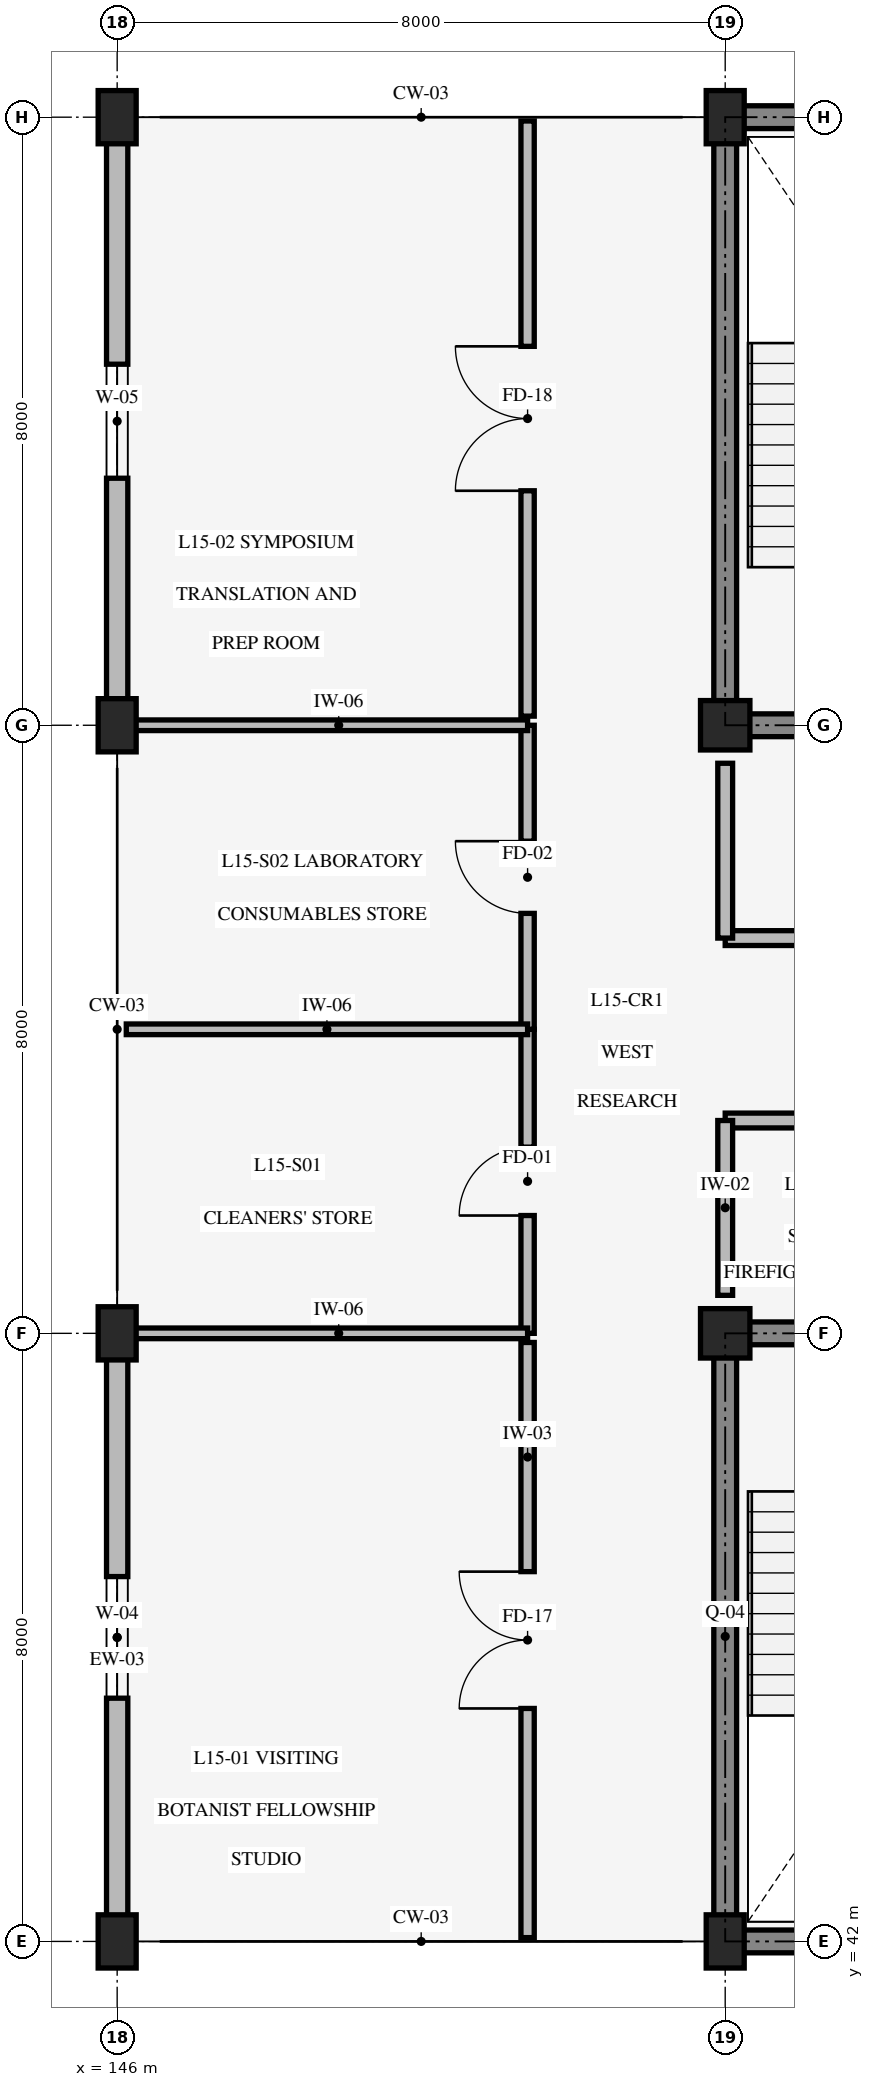
"""IFC4 building model, lengths in metres.
Left out: names, types, materials, properties, quantities, classifications, styles, units other than length and angle.
Written with IfcOpenShell. Run it as: python <this file> out.ifc"""

import sys

from ifc_helpers import new_model, si_unit, direction, frame, frame_2d, origin, origin_2d, place, context, subcontext, project, spatial, rectangle, extrude, element, fill, save


model = new_model("IFC4")
c1 = context("Model", 3, precision=1e-05, world=origin(), true_north=direction((0.0, 1.0)))
c2 = subcontext(c1, "Body", "Model", "MODEL_VIEW")
j1 = project(units=[si_unit("LENGTHUNIT", "METRE"), si_unit("PLANEANGLEUNIT", "RADIAN")], contexts=[c1])
p1 = place(None, origin())
s1 = spatial("IfcSite", under=j1, at=p1, CompositionType="ELEMENT")
p2 = place(p1, origin())
s2 = spatial("IfcBuilding", under=s1, at=p2, CompositionType="ELEMENT")
p3 = place(p2, frame((0.0, 0.0, 61.2)))
s3 = spatial("IfcBuildingStorey", under=s2, at=p3, CompositionType="ELEMENT", Elevation=61.2)
p4 = place(p3, frame((154.0, 42.0, 0.0), z_axis=(0.0, 0.0, 1.0), x_axis=(1.0, 0.0, 0.0)))
e1 = element("IfcWall", 1, at=p4, inside=s3, PredefinedType="SHEAR", context=c2, shape_type="SweptSolid", body=[
    extrude(rectangle(XDim=8.0, YDim=0.3, at=frame_2d((4.0, 0.0))), origin(), (0.0, 0.0, 1.0), 3.95),
])
p5 = place(p3, frame((162.0, 50.0, 0.0), z_axis=(0.0, 0.0, 1.0), x_axis=(-1.0, 0.0, 0.0)))
e2 = element("IfcWall", 2, at=p5, inside=s3, PredefinedType="SHEAR", context=c2, shape_type="SweptSolid", body=[
    extrude(rectangle(XDim=8.0, YDim=0.3, at=frame_2d((4.0, 0.0))), origin(), (0.0, 0.0, 1.0), 3.95),
])
p6 = place(p5, frame((5.3, 0.0, 0.0)))
e3 = element("IfcOpeningElement", 3, at=p6, cuts=e2, PredefinedType="OPENING", context=c2, shape_type="SweptSolid", body=[
    extrude(rectangle(XDim=1.3, YDim=2.15, at=frame_2d((0.65, 1.075))), frame((0.0, 0.16, 0.0), z_axis=(0.0, -1.0, 0.0), x_axis=(1.0, 0.0, 0.0)), (0.0, 0.0, 1.0), 0.32),
])
p7 = place(p5, frame((1.45, 0.0, 0.0)))
e4 = element("IfcOpeningElement", 4, at=p7, cuts=e2, PredefinedType="OPENING", context=c2, shape_type="SweptSolid", body=[
    extrude(rectangle(XDim=1.1, YDim=2.2, at=frame_2d((0.55, 1.1))), frame((0.0, 0.16, 0.0), z_axis=(0.0, -1.0, 0.0), x_axis=(1.0, 0.0, 0.0)), (0.0, 0.0, 1.0), 0.32),
])
p8 = place(p3, frame((154.0, 50.0, 0.0), z_axis=(0.0, 0.0, 1.0), x_axis=(0.0, -1.0, 0.0)))
e5 = element("IfcWall", 5, at=p8, inside=s3, PredefinedType="SHEAR", context=c2, shape_type="SweptSolid", body=[
    extrude(rectangle(XDim=8.0, YDim=0.3, at=frame_2d((4.0, 0.0))), origin(), (0.0, 0.0, 1.0), 3.95),
])
p9 = place(p3, frame((154.0, 58.0, 0.0), z_axis=(0.0, 0.0, 1.0), x_axis=(1.0, 0.0, 0.0)))
e6 = element("IfcWall", 6, at=p9, inside=s3, PredefinedType="SHEAR", context=c2, shape_type="SweptSolid", body=[
    extrude(rectangle(XDim=8.0, YDim=0.3, at=frame_2d((4.0, 0.0))), origin(), (0.0, 0.0, 1.0), 3.95),
])
p10 = place(p9, frame((1.4, 0.0, 0.0)))
e7 = element("IfcOpeningElement", 7, at=p10, cuts=e6, PredefinedType="OPENING", context=c2, shape_type="SweptSolid", body=[
    extrude(rectangle(XDim=1.3, YDim=2.15, at=frame_2d((0.65, 1.075))), frame((0.0, 0.16, 0.0), z_axis=(0.0, -1.0, 0.0), x_axis=(1.0, 0.0, 0.0)), (0.0, 0.0, 1.0), 0.32),
])
p11 = place(p9, frame((5.3, 0.0, 0.0)))
e8 = element("IfcOpeningElement", 8, at=p11, cuts=e6, PredefinedType="OPENING", context=c2, shape_type="SweptSolid", body=[
    extrude(rectangle(XDim=1.1, YDim=2.2, at=frame_2d((0.55, 1.1))), frame((0.0, 0.16, 0.0), z_axis=(0.0, -1.0, 0.0), x_axis=(1.0, 0.0, 0.0)), (0.0, 0.0, 1.0), 0.32),
])
for number, where, z_axis, x_axis in (
    (9, (162.0, 66.0, 0.0), (0.0, 0.0, 1.0), (-1.0, 0.0, 0.0)),
    (10, (154.0, 66.0, 0.0), (0.0, 0.0, 1.0), (0.0, -1.0, 0.0)),
):
    element("IfcWall", number, at=place(p3, frame(where, z_axis=z_axis, x_axis=x_axis)), inside=s3, PredefinedType="SHEAR", context=c2, shape_type="SweptSolid", body=[
        extrude(rectangle(XDim=8.0, YDim=0.3, at=frame_2d((4.0, 0.0))), origin(), (0.0, 0.0, 1.0), 3.95),
    ])
for number, where, z_axis, x_axis in (
    (11, (146.0, 42.0, 0.0), (0.0, 0.0, 1.0), (1.0, 0.0, 0.0)),
    (12, (146.0, 50.0, 0.0), (0.0, 0.0, 1.0), (1.0, 0.0, 0.0)),
    (13, (146.0, 58.0, 0.0), (0.0, 0.0, 1.0), (1.0, 0.0, 0.0)),
    (14, (146.0, 66.0, 0.0), (0.0, 0.0, 1.0), (1.0, 0.0, 0.0)),
    (15, (154.0, 42.0, 0.0), (0.0, 0.0, 1.0), (1.0, 0.0, 0.0)),
):
    element("IfcColumn", number, at=place(p3, frame(where, z_axis=z_axis, x_axis=x_axis)), inside=s3, PredefinedType="COLUMN", context=c2, shape_type="SweptSolid", body=[
        extrude(rectangle(XDim=0.5, YDim=0.7, at=origin_2d()), origin(), (0.0, 0.0, 1.0), 4.2),
    ])
for number, where, z_axis, x_axis in (
    (16, (154.0, 50.0, 0.0), (0.0, 0.0, 1.0), (1.0, 0.0, 0.0)),
    (17, (154.0, 58.0, 0.0), (0.0, 0.0, 1.0), (1.0, 0.0, 0.0)),
):
    element("IfcColumn", number, at=place(p3, frame(where, z_axis=z_axis, x_axis=x_axis)), inside=s3, PredefinedType="COLUMN", context=c2, shape_type="SweptSolid", body=[
        extrude(rectangle(XDim=0.65, YDim=0.65, at=origin_2d()), origin(), (0.0, 0.0, 1.0), 4.2),
    ])
p12 = place(p3, frame((154.0, 66.0, 0.0), z_axis=(0.0, 0.0, 1.0), x_axis=(1.0, 0.0, 0.0)))
e18 = element("IfcColumn", 18, at=p12, inside=s3, PredefinedType="COLUMN", context=c2, shape_type="SweptSolid", body=[
    extrude(rectangle(XDim=0.5, YDim=0.7, at=origin_2d()), origin(), (0.0, 0.0, 1.0), 4.2),
])
p13 = place(p3, frame((146.0, 42.0, 0.0), z_axis=(0.0, 0.0, 1.0), x_axis=(0.0, 1.0, 0.0)))
e19 = element("IfcWall", 19, at=p13, inside=s3, PredefinedType="STANDARD", context=c2, shape_type="SweptSolid", body=[
    extrude(rectangle(XDim=8.0, YDim=0.28, at=frame_2d((4.0, 0.0))), origin(), (0.0, 0.0, 1.0), 3.29),
])
p14 = place(p13, frame((3.2, 0.0, 0.85)))
e20 = element("IfcOpeningElement", 20, at=p14, cuts=e19, PredefinedType="OPENING", context=c2, shape_type="SweptSolid", body=[
    extrude(rectangle(XDim=1.6, YDim=1.2, at=frame_2d((0.8, 0.6))), frame((0.0, 0.15, 0.0), z_axis=(0.0, -1.0, 0.0), x_axis=(1.0, 0.0, 0.0)), (0.0, 0.0, 1.0), 0.3),
])
p15 = place(p3, frame((146.0, 58.0, 0.0), z_axis=(0.0, 0.0, 1.0), x_axis=(0.0, 1.0, 0.0)))
e21 = element("IfcWall", 21, at=p15, inside=s3, PredefinedType="STANDARD", context=c2, shape_type="SweptSolid", body=[
    extrude(rectangle(XDim=8.0, YDim=0.28, at=frame_2d((4.0, 0.0))), origin(), (0.0, 0.0, 1.0), 3.29),
])
p16 = place(p15, frame((3.25, 0.0, 0.85)))
e22 = element("IfcOpeningElement", 22, at=p16, cuts=e21, PredefinedType="OPENING", context=c2, shape_type="SweptSolid", body=[
    extrude(rectangle(XDim=1.5, YDim=1.5, at=frame_2d((0.75, 0.75))), frame((0.0, 0.15, 0.0), z_axis=(0.0, -1.0, 0.0), x_axis=(1.0, 0.0, 0.0)), (0.0, 0.0, 1.0), 0.3),
])
p17 = place(p3, frame((154.0, 52.8, 0.0), z_axis=(0.0, 0.0, 1.0), x_axis=(1.0, 0.0, 0.0)))
e23 = element("IfcWall", 23, at=p17, inside=s3, PredefinedType="STANDARD", context=c2, shape_type="SweptSolid", body=[
    extrude(rectangle(XDim=7.6, YDim=0.195, at=frame_2d((3.8, 0.0))), origin(), (0.0, 0.0, 1.0), 3.9),
])
p18 = place(p17, frame((2.8, 0.0, 0.0)))
e24 = element("IfcOpeningElement", 24, at=p18, cuts=e23, PredefinedType="OPENING", context=c2, shape_type="SweptSolid", body=[
    extrude(rectangle(XDim=1.35, YDim=2.15, at=frame_2d((0.675, 1.075))), frame((0.0, 0.107, 0.0), z_axis=(0.0, -1.0, 0.0), x_axis=(1.0, 0.0, 0.0)), (0.0, 0.0, 1.0), 0.215),
])
p19 = place(p3, frame((154.0, 50.5, 0.0), z_axis=(0.0, 0.0, 1.0), x_axis=(0.0, 1.0, 0.0)))
e25 = element("IfcWall", 25, at=p19, inside=s3, PredefinedType="STANDARD", context=c2, shape_type="SweptSolid", body=[
    extrude(rectangle(XDim=2.3, YDim=0.195, at=frame_2d((1.15, 0.0))), origin(), (0.0, 0.0, 1.0), 3.29),
])
p20 = place(p3, frame((154.0, 55.2, 0.0), z_axis=(0.0, 0.0, 1.0), x_axis=(1.0, 0.0, 0.0)))
e26 = element("IfcWall", 26, at=p20, inside=s3, PredefinedType="STANDARD", context=c2, shape_type="SweptSolid", body=[
    extrude(rectangle(XDim=7.6, YDim=0.195, at=frame_2d((3.8, 0.0))), origin(), (0.0, 0.0, 1.0), 3.9),
])
p21 = place(p20, frame((2.8, 0.0, 0.0)))
e27 = element("IfcOpeningElement", 27, at=p21, cuts=e26, PredefinedType="OPENING", context=c2, shape_type="SweptSolid", body=[
    extrude(rectangle(XDim=1.45, YDim=2.2, at=frame_2d((0.725, 1.1))), frame((0.0, 0.107, 0.0), z_axis=(0.0, -1.0, 0.0), x_axis=(1.0, 0.0, 0.0)), (0.0, 0.0, 1.0), 0.215),
])
p22 = place(p3, frame((154.0, 55.2, 0.0), z_axis=(0.0, 0.0, 1.0), x_axis=(0.0, 1.0, 0.0)))
e28 = element("IfcWall", 28, at=p22, inside=s3, PredefinedType="STANDARD", context=c2, shape_type="SweptSolid", body=[
    extrude(rectangle(XDim=2.3, YDim=0.195, at=frame_2d((1.15, 0.0))), origin(), (0.0, 0.0, 1.0), 3.29),
])
p23 = place(p3, frame((151.4, 42.05, 0.0), z_axis=(0.0, 0.0, 1.0), x_axis=(0.0, 1.0, 0.0)))
e29 = element("IfcWall", 29, at=p23, inside=s3, PredefinedType="STANDARD", context=c2, shape_type="SweptSolid", body=[
    extrude(rectangle(XDim=7.83, YDim=0.175, at=frame_2d((3.915, 0.0))), origin(), (0.0, 0.0, 1.0), 3.9),
])
p24 = place(p23, frame((3.015, 0.0, 0.0)))
e30 = element("IfcOpeningElement", 30, at=p24, cuts=e29, PredefinedType="OPENING", context=c2, shape_type="SweptSolid", body=[
    extrude(rectangle(XDim=1.8, YDim=2.3, at=frame_2d((0.9, 1.15))), frame((0.0, 0.098, 0.0), z_axis=(0.0, -1.0, 0.0), x_axis=(1.0, 0.0, 0.0)), (0.0, 0.0, 1.0), 0.195),
])
p25 = place(p3, frame((151.4, 58.12, 0.0), z_axis=(0.0, 0.0, 1.0), x_axis=(0.0, 1.0, 0.0)))
e31 = element("IfcWall", 31, at=p25, inside=s3, PredefinedType="STANDARD", context=c2, shape_type="SweptSolid", body=[
    extrude(rectangle(XDim=7.83, YDim=0.175, at=frame_2d((3.915, 0.0))), origin(), (0.0, 0.0, 1.0), 3.9),
])
p26 = place(p25, frame((2.965, 0.0, 0.0)))
e32 = element("IfcOpeningElement", 32, at=p26, cuts=e31, PredefinedType="OPENING", context=c2, shape_type="SweptSolid", body=[
    extrude(rectangle(XDim=1.9, YDim=2.35, at=frame_2d((0.95, 1.175))), frame((0.0, 0.098, 0.0), z_axis=(0.0, -1.0, 0.0), x_axis=(1.0, 0.0, 0.0)), (0.0, 0.0, 1.0), 0.195),
])
p27 = place(p3, frame((151.4, 50.0, 0.0), z_axis=(0.0, 0.0, 1.0), x_axis=(0.0, 1.0, 0.0)))
e33 = element("IfcWall", 33, at=p27, inside=s3, PredefinedType="STANDARD", context=c2, shape_type="SweptSolid", body=[
    extrude(rectangle(XDim=4.0, YDim=0.175, at=frame_2d((2.0, 0.0))), origin(), (0.0, 0.0, 1.0), 3.9),
])
p28 = place(p27, frame((1.55, 0.0, 0.0)))
e34 = element("IfcOpeningElement", 34, at=p28, cuts=e33, PredefinedType="OPENING", context=c2, shape_type="SweptSolid", body=[
    extrude(rectangle(XDim=0.9, YDim=2.1, at=frame_2d((0.45, 1.05))), frame((0.0, 0.098, 0.0), z_axis=(0.0, -1.0, 0.0), x_axis=(1.0, 0.0, 0.0)), (0.0, 0.0, 1.0), 0.195),
])
p29 = place(p3, frame((151.4, 54.0, 0.0), z_axis=(0.0, 0.0, 1.0), x_axis=(0.0, 1.0, 0.0)))
e35 = element("IfcWall", 35, at=p29, inside=s3, PredefinedType="STANDARD", context=c2, shape_type="SweptSolid", body=[
    extrude(rectangle(XDim=4.0, YDim=0.175, at=frame_2d((2.0, 0.0))), origin(), (0.0, 0.0, 1.0), 3.9),
])
p30 = place(p29, frame((1.525, 0.0, 0.0)))
e36 = element("IfcOpeningElement", 36, at=p30, cuts=e35, PredefinedType="OPENING", context=c2, shape_type="SweptSolid", body=[
    extrude(rectangle(XDim=0.95, YDim=2.1, at=frame_2d((0.475, 1.05))), frame((0.0, 0.098, 0.0), z_axis=(0.0, -1.0, 0.0), x_axis=(1.0, 0.0, 0.0)), (0.0, 0.0, 1.0), 0.195),
])
p31 = place(p3, frame((146.12, 50.0, 0.0), z_axis=(0.0, 0.0, 1.0), x_axis=(1.0, 0.0, 0.0)))
e37 = element("IfcWall", 37, at=p31, inside=s3, PredefinedType="STANDARD", context=c2, shape_type="SweptSolid", body=[
    extrude(rectangle(XDim=5.28, YDim=0.14, at=frame_2d((2.64, 0.0))), origin(), (0.0, 0.0, 1.0), 3.24),
])
p32 = place(p3, frame((146.12, 54.0, 0.0), z_axis=(0.0, 0.0, 1.0), x_axis=(1.0, 0.0, 0.0)))
e38 = element("IfcWall", 38, at=p32, inside=s3, PredefinedType="STANDARD", context=c2, shape_type="SweptSolid", body=[
    extrude(rectangle(XDim=5.28, YDim=0.14, at=frame_2d((2.64, 0.0))), origin(), (0.0, 0.0, 1.0), 3.9),
])
p33 = place(p3, frame((146.12, 58.0, 0.0), z_axis=(0.0, 0.0, 1.0), x_axis=(1.0, 0.0, 0.0)))
e39 = element("IfcWall", 39, at=p33, inside=s3, PredefinedType="STANDARD", context=c2, shape_type="SweptSolid", body=[
    extrude(rectangle(XDim=5.28, YDim=0.14, at=frame_2d((2.64, 0.0))), origin(), (0.0, 0.0, 1.0), 3.24),
])
p34 = place(p14, origin())
e40 = element("IfcWindow", 40, at=p34, inside=s3, PartitioningType="SINGLE_PANEL", PredefinedType="WINDOW", context=c2, shape_type="SweptSolid", body=[
    extrude(rectangle(XDim=1.6, YDim=1.2, at=frame_2d((0.8, 0.6))), frame((0.0, 0.03, 0.0), z_axis=(0.0, -1.0, 0.0), x_axis=(1.0, 0.0, 0.0)), (0.0, 0.0, 1.0), 0.06),
])
fill(e20, e40)
p35 = place(p16, origin())
e41 = element("IfcWindow", 41, at=p35, inside=s3, PartitioningType="SINGLE_PANEL", PredefinedType="WINDOW", context=c2, shape_type="SweptSolid", body=[
    extrude(rectangle(XDim=1.5, YDim=1.5, at=frame_2d((0.75, 0.75))), frame((0.0, 0.03, 0.0), z_axis=(0.0, -1.0, 0.0), x_axis=(1.0, 0.0, 0.0)), (0.0, 0.0, 1.0), 0.06),
])
fill(e22, e41)
p36 = place(p24, origin())
e42 = element("IfcDoor", 42, at=p36, inside=s3, OperationType="DOUBLE_DOOR_SINGLE_SWING", PredefinedType="DOOR", context=c2, shape_type="SweptSolid", body=[
    extrude(rectangle(XDim=1.8, YDim=2.3, at=frame_2d((0.9, 1.15))), frame((0.0, 0.025, 0.0), z_axis=(0.0, -1.0, 0.0), x_axis=(1.0, 0.0, 0.0)), (0.0, 0.0, 1.0), 0.05),
])
fill(e30, e42)
p37 = place(p26, origin())
e43 = element("IfcDoor", 43, at=p37, inside=s3, OperationType="DOUBLE_DOOR_SINGLE_SWING", PredefinedType="DOOR", context=c2, shape_type="SweptSolid", body=[
    extrude(rectangle(XDim=1.9, YDim=2.35, at=frame_2d((0.95, 1.175))), frame((0.0, 0.025, 0.0), z_axis=(0.0, -1.0, 0.0), x_axis=(1.0, 0.0, 0.0)), (0.0, 0.0, 1.0), 0.05),
])
fill(e32, e43)
p38 = place(p28, origin())
e44 = element("IfcDoor", 44, at=p38, inside=s3, OperationType="SINGLE_SWING_LEFT", PredefinedType="DOOR", context=c2, shape_type="SweptSolid", body=[
    extrude(rectangle(XDim=0.9, YDim=2.1, at=frame_2d((0.45, 1.05))), frame((0.0, 0.025, 0.0), z_axis=(0.0, -1.0, 0.0), x_axis=(1.0, 0.0, 0.0)), (0.0, 0.0, 1.0), 0.05),
])
fill(e34, e44)
p39 = place(p30, origin())
e45 = element("IfcDoor", 45, at=p39, inside=s3, OperationType="SINGLE_SWING_RIGHT", PredefinedType="DOOR", context=c2, shape_type="SweptSolid", body=[
    extrude(rectangle(XDim=0.95, YDim=2.1, at=frame_2d((0.475, 1.05))), frame((0.0, 0.025, 0.0), z_axis=(0.0, -1.0, 0.0), x_axis=(1.0, 0.0, 0.0)), (0.0, 0.0, 1.0), 0.05),
])
fill(e36, e45)
save(model, sys.argv[1])
